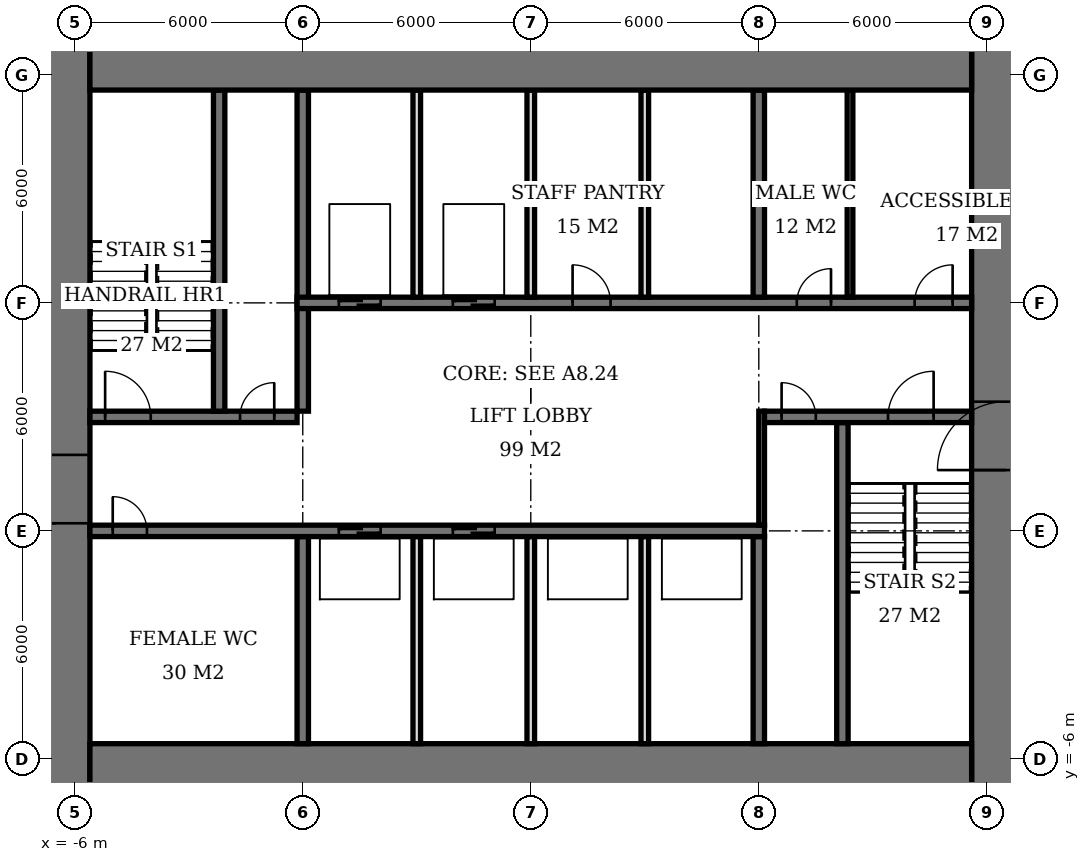
"""IFC4 building model, lengths in metres.
Left out: names, types, materials, properties, quantities, classifications, styles, units other than length and angle.
Written with IfcOpenShell. Run it as: python <this file> out.ifc"""

import sys

from ifc_helpers import new_model, si_unit, direction, frame, frame_2d, origin, place, context, subcontext, project, spatial, rectangle, extrude, element, fill, save


model = new_model("IFC4")
c1 = context("Model", 3, precision=1e-05, world=origin(), true_north=direction((0.0, 1.0)))
c2 = subcontext(c1, "Body", "Model", "MODEL_VIEW")
j1 = project(units=[si_unit("LENGTHUNIT", "METRE"), si_unit("PLANEANGLEUNIT", "RADIAN")], contexts=[c1])
p1 = place(None, origin())
s1 = spatial("IfcSite", under=j1, at=p1, CompositionType="ELEMENT")
p2 = place(p1, origin())
s2 = spatial("IfcBuilding", under=s1, at=p2, CompositionType="ELEMENT")
p3 = place(p2, frame((0.0, 0.0, 144.5)))
s3 = spatial("IfcBuildingStorey", under=s2, at=p3, CompositionType="ELEMENT", Elevation=144.5)
for number, where, z_axis, x_axis in (
    (1, (-5.6, -6.6, 0.0), (0.0, 0.0, 1.0), (1.0, 0.0, 0.0)),
    (2, (-5.6, 12.6, 0.0), (0.0, 0.0, 1.0), (1.0, 0.0, 0.0)),
):
    element("IfcWall", number, at=place(p3, frame(where, z_axis=z_axis, x_axis=x_axis)), inside=s3, PredefinedType="SHEAR", context=c2, shape_type="SweptSolid", body=[
        extrude(rectangle(XDim=23.2, YDim=2.0, at=frame_2d((11.6, 0.0))), origin(), (0.0, 0.0, 1.0), 3.9),
    ])
p4 = place(p3, frame((-6.5, -7.6, 0.0), z_axis=(0.0, 0.0, 1.0), x_axis=(0.0, 1.0, 0.0)))
e3 = element("IfcWall", 3, at=p4, inside=s3, PredefinedType="SHEAR", context=c2, shape_type="SweptSolid", body=[
    extrude(rectangle(XDim=21.2, YDim=1.8, at=frame_2d((10.6, 0.0))), origin(), (0.0, 0.0, 1.0), 3.9),
])
p5 = place(p4, frame((7.8, 0.0, 0.0)))
e4 = element("IfcOpeningElement", 4, at=p5, cuts=e3, PredefinedType="OPENING", context=c2, shape_type="SweptSolid", body=[
    extrude(rectangle(XDim=1.8, YDim=2.4, at=frame_2d((0.9, 1.2))), frame((0.0, 0.91, 0.0), z_axis=(0.0, -1.0, 0.0), x_axis=(1.0, 0.0, 0.0)), (0.0, 0.0, 1.0), 1.82),
])
p6 = place(p3, frame((18.5, -7.6, 0.0), z_axis=(0.0, 0.0, 1.0), x_axis=(0.0, 1.0, 0.0)))
e5 = element("IfcWall", 5, at=p6, inside=s3, PredefinedType="SHEAR", context=c2, shape_type="SweptSolid", body=[
    extrude(rectangle(XDim=21.2, YDim=1.8, at=frame_2d((10.6, 0.0))), origin(), (0.0, 0.0, 1.0), 3.9),
])
p7 = place(p6, frame((9.2, 0.0, 0.0)))
e6 = element("IfcOpeningElement", 6, at=p7, cuts=e5, PredefinedType="OPENING", context=c2, shape_type="SweptSolid", body=[
    extrude(rectangle(XDim=1.8, YDim=2.4, at=frame_2d((0.9, 1.2))), frame((0.0, 0.91, 0.0), z_axis=(0.0, -1.0, 0.0), x_axis=(1.0, 0.0, 0.0)), (0.0, 0.0, 1.0), 1.82),
])
p8 = place(p3, frame((-5.6, 0.0, 0.0), z_axis=(0.0, 0.0, 1.0), x_axis=(1.0, 0.0, 0.0)))
e7 = element("IfcWall", 7, at=p8, inside=s3, PredefinedType="SHEAR", context=c2, shape_type="SweptSolid", body=[
    extrude(rectangle(XDim=17.75, YDim=0.3, at=frame_2d((8.875, 0.0))), origin(), (0.0, 0.0, 1.0), 3.9),
])
p9 = place(p8, frame((0.6, 0.0, 0.0)))
e8 = element("IfcOpeningElement", 8, at=p9, cuts=e7, PredefinedType="OPENING", context=c2, shape_type="SweptSolid", body=[
    extrude(rectangle(XDim=0.9, YDim=2.1, at=frame_2d((0.45, 1.05))), frame((0.0, 0.16, 0.0), z_axis=(0.0, -1.0, 0.0), x_axis=(1.0, 0.0, 0.0)), (0.0, 0.0, 1.0), 0.32),
])
p10 = place(p8, frame((6.55, 0.0, 0.0)))
e9 = element("IfcOpeningElement", 9, at=p10, cuts=e7, PredefinedType="OPENING", context=c2, shape_type="SweptSolid", body=[
    extrude(rectangle(XDim=1.1, YDim=2.1, at=frame_2d((0.55, 1.05))), frame((0.0, 0.16, 0.0), z_axis=(0.0, -1.0, 0.0), x_axis=(1.0, 0.0, 0.0)), (0.0, 0.0, 1.0), 0.32),
])
p11 = place(p8, frame((9.55, 0.0, 0.0)))
e10 = element("IfcOpeningElement", 10, at=p11, cuts=e7, PredefinedType="OPENING", context=c2, shape_type="SweptSolid", body=[
    extrude(rectangle(XDim=1.1, YDim=2.1, at=frame_2d((0.55, 1.05))), frame((0.0, 0.16, 0.0), z_axis=(0.0, -1.0, 0.0), x_axis=(1.0, 0.0, 0.0)), (0.0, 0.0, 1.0), 0.32),
])
p12 = place(p3, frame((-5.6, 3.0, 0.0), z_axis=(0.0, 0.0, 1.0), x_axis=(1.0, 0.0, 0.0)))
e11 = element("IfcWall", 11, at=p12, inside=s3, PredefinedType="SHEAR", context=c2, shape_type="SweptSolid", body=[
    extrude(rectangle(XDim=5.45, YDim=0.3, at=frame_2d((2.725, 0.0))), origin(), (0.0, 0.0, 1.0), 3.9),
])
p13 = place(p12, frame((0.4, 0.0, 0.0)))
e12 = element("IfcOpeningElement", 12, at=p13, cuts=e11, PredefinedType="OPENING", context=c2, shape_type="SweptSolid", body=[
    extrude(rectangle(XDim=1.2, YDim=2.1, at=frame_2d((0.6, 1.05))), frame((0.0, 0.16, 0.0), z_axis=(0.0, -1.0, 0.0), x_axis=(1.0, 0.0, 0.0)), (0.0, 0.0, 1.0), 0.32),
])
p14 = place(p12, frame((3.95, 0.0, 0.0)))
e13 = element("IfcOpeningElement", 13, at=p14, cuts=e11, PredefinedType="OPENING", context=c2, shape_type="SweptSolid", body=[
    extrude(rectangle(XDim=0.9, YDim=2.1, at=frame_2d((0.45, 1.05))), frame((0.0, 0.16, 0.0), z_axis=(0.0, -1.0, 0.0), x_axis=(1.0, 0.0, 0.0)), (0.0, 0.0, 1.0), 0.32),
])
p15 = place(p3, frame((12.15, 3.0, 0.0), z_axis=(0.0, 0.0, 1.0), x_axis=(1.0, 0.0, 0.0)))
e14 = element("IfcWall", 14, at=p15, inside=s3, PredefinedType="SHEAR", context=c2, shape_type="SweptSolid", body=[
    extrude(rectangle(XDim=5.45, YDim=0.3, at=frame_2d((2.725, 0.0))), origin(), (0.0, 0.0, 1.0), 3.9),
])
p16 = place(p15, frame((3.25, 0.0, 0.0)))
e15 = element("IfcOpeningElement", 15, at=p16, cuts=e14, PredefinedType="OPENING", context=c2, shape_type="SweptSolid", body=[
    extrude(rectangle(XDim=1.2, YDim=2.1, at=frame_2d((0.6, 1.05))), frame((0.0, 0.16, 0.0), z_axis=(0.0, -1.0, 0.0), x_axis=(1.0, 0.0, 0.0)), (0.0, 0.0, 1.0), 0.32),
])
p17 = place(p15, frame((0.45, 0.0, 0.0)))
e16 = element("IfcOpeningElement", 16, at=p17, cuts=e14, PredefinedType="OPENING", context=c2, shape_type="SweptSolid", body=[
    extrude(rectangle(XDim=0.9, YDim=2.1, at=frame_2d((0.45, 1.05))), frame((0.0, 0.16, 0.0), z_axis=(0.0, -1.0, 0.0), x_axis=(1.0, 0.0, 0.0)), (0.0, 0.0, 1.0), 0.32),
])
p18 = place(p3, frame((-0.15, 6.0, 0.0), z_axis=(0.0, 0.0, 1.0), x_axis=(1.0, 0.0, 0.0)))
e17 = element("IfcWall", 17, at=p18, inside=s3, PredefinedType="SHEAR", context=c2, shape_type="SweptSolid", body=[
    extrude(rectangle(XDim=17.75, YDim=0.3, at=frame_2d((8.875, 0.0))), origin(), (0.0, 0.0, 1.0), 3.9),
])
p19 = place(p18, frame((13.15, 0.0, 0.0)))
e18 = element("IfcOpeningElement", 18, at=p19, cuts=e17, PredefinedType="OPENING", context=c2, shape_type="SweptSolid", body=[
    extrude(rectangle(XDim=0.9, YDim=2.1, at=frame_2d((0.45, 1.05))), frame((0.0, 0.16, 0.0), z_axis=(0.0, -1.0, 0.0), x_axis=(1.0, 0.0, 0.0)), (0.0, 0.0, 1.0), 0.32),
])
p20 = place(p18, frame((16.25, 0.0, 0.0)))
e19 = element("IfcOpeningElement", 19, at=p20, cuts=e17, PredefinedType="OPENING", context=c2, shape_type="SweptSolid", body=[
    extrude(rectangle(XDim=1.0, YDim=2.1, at=frame_2d((0.5, 1.05))), frame((0.0, 0.16, 0.0), z_axis=(0.0, -1.0, 0.0), x_axis=(1.0, 0.0, 0.0)), (0.0, 0.0, 1.0), 0.32),
])
p21 = place(p18, frame((7.25, 0.0, 0.0)))
e20 = element("IfcOpeningElement", 20, at=p21, cuts=e17, PredefinedType="OPENING", context=c2, shape_type="SweptSolid", body=[
    extrude(rectangle(XDim=1.0, YDim=2.1, at=frame_2d((0.5, 1.05))), frame((0.0, 0.16, 0.0), z_axis=(0.0, -1.0, 0.0), x_axis=(1.0, 0.0, 0.0)), (0.0, 0.0, 1.0), 0.32),
])
p22 = place(p18, frame((1.1, 0.0, 0.0)))
e21 = element("IfcOpeningElement", 21, at=p22, cuts=e17, PredefinedType="OPENING", context=c2, shape_type="SweptSolid", body=[
    extrude(rectangle(XDim=1.1, YDim=2.1, at=frame_2d((0.55, 1.05))), frame((0.0, 0.16, 0.0), z_axis=(0.0, -1.0, 0.0), x_axis=(1.0, 0.0, 0.0)), (0.0, 0.0, 1.0), 0.32),
])
p23 = place(p18, frame((4.1, 0.0, 0.0)))
e22 = element("IfcOpeningElement", 22, at=p23, cuts=e17, PredefinedType="OPENING", context=c2, shape_type="SweptSolid", body=[
    extrude(rectangle(XDim=1.1, YDim=2.1, at=frame_2d((0.55, 1.05))), frame((0.0, 0.16, 0.0), z_axis=(0.0, -1.0, 0.0), x_axis=(1.0, 0.0, 0.0)), (0.0, 0.0, 1.0), 0.32),
])
p24 = place(p3, frame((0.0, -5.6, 0.0), z_axis=(0.0, 0.0, 1.0), x_axis=(0.0, 1.0, 0.0)))
e23 = element("IfcWall", 23, at=p24, inside=s3, PredefinedType="SHEAR", context=c2, shape_type="SweptSolid", body=[
    extrude(rectangle(XDim=5.45, YDim=0.3, at=frame_2d((2.725, 0.0))), origin(), (0.0, 0.0, 1.0), 3.9),
])
p25 = place(p3, frame((0.0, 3.15, 0.0), z_axis=(0.0, 0.0, 1.0), x_axis=(0.0, 1.0, 0.0)))
e24 = element("IfcWall", 24, at=p25, inside=s3, PredefinedType="SHEAR", context=c2, shape_type="SweptSolid", body=[
    extrude(rectangle(XDim=8.45, YDim=0.3, at=frame_2d((4.225, 0.0))), origin(), (0.0, 0.0, 1.0), 3.9),
])
for number, where, z_axis, x_axis in (
    (25, (12.0, -5.6, 0.0), (0.0, 0.0, 1.0), (0.0, 1.0, 0.0)),
    (26, (12.0, 6.15, 0.0), (0.0, 0.0, 1.0), (0.0, 1.0, 0.0)),
):
    element("IfcWall", number, at=place(p3, frame(where, z_axis=z_axis, x_axis=x_axis)), inside=s3, PredefinedType="SHEAR", context=c2, shape_type="SweptSolid", body=[
        extrude(rectangle(XDim=5.45, YDim=0.3, at=frame_2d((2.725, 0.0))), origin(), (0.0, 0.0, 1.0), 3.9),
    ])
for number, where, z_axis, x_axis in (
    (27, (-2.2, 3.15, 0.0), (0.0, 0.0, 1.0), (0.0, 1.0, 0.0)),
    (28, (14.2, -5.6, 0.0), (0.0, 0.0, 1.0), (0.0, 1.0, 0.0)),
):
    element("IfcWall", number, at=place(p3, frame(where, z_axis=z_axis, x_axis=x_axis)), inside=s3, PredefinedType="SHEAR", context=c2, shape_type="SweptSolid", body=[
        extrude(rectangle(XDim=8.45, YDim=0.3, at=frame_2d((4.225, 0.0))), origin(), (0.0, 0.0, 1.0), 3.9),
    ])
for number, where, z_axis, x_axis in (
    (29, (3.0, 6.15, 0.0), (0.0, 0.0, 1.0), (0.0, 1.0, 0.0)),
    (30, (6.0, 6.15, 0.0), (0.0, 0.0, 1.0), (0.0, 1.0, 0.0)),
    (31, (9.0, 6.15, 0.0), (0.0, 0.0, 1.0), (0.0, 1.0, 0.0)),
    (32, (3.0, -5.6, 0.0), (0.0, 0.0, 1.0), (0.0, 1.0, 0.0)),
    (33, (6.0, -5.6, 0.0), (0.0, 0.0, 1.0), (0.0, 1.0, 0.0)),
    (34, (9.0, -5.6, 0.0), (0.0, 0.0, 1.0), (0.0, 1.0, 0.0)),
):
    element("IfcWall", number, at=place(p3, frame(where, z_axis=z_axis, x_axis=x_axis)), inside=s3, PredefinedType="SOLIDWALL", context=c2, shape_type="SweptSolid", body=[
        extrude(rectangle(XDim=5.45, YDim=0.2, at=frame_2d((2.725, 0.0))), origin(), (0.0, 0.0, 1.0), 3.9),
    ])
p26 = place(p3, frame((14.4, 6.15, 0.0), z_axis=(0.0, 0.0, 1.0), x_axis=(0.0, 1.0, 0.0)))
e35 = element("IfcWall", 35, at=p26, inside=s3, PredefinedType="PLUMBINGWALL", context=c2, shape_type="SweptSolid", body=[
    extrude(rectangle(XDim=5.45, YDim=0.15, at=frame_2d((2.725, 0.0))), origin(), (0.0, 0.0, 1.0), 3.65),
])
p27 = place(p3, frame((12.075, 0.15, 0.0), z_axis=(0.0, 0.0, 1.0), x_axis=(0.0, 1.0, 0.0)))
e36 = element("IfcWall", 36, at=p27, inside=s3, PredefinedType="PARTITIONING", context=c2, shape_type="SweptSolid", body=[
    extrude(rectangle(XDim=3.0, YDim=0.15, at=frame_2d((1.5, 0.0))), origin(), (0.0, 0.0, 1.0), 3.65),
])
p28 = place(p5, origin())
e37 = element("IfcDoor", 37, at=p28, inside=s3, OperationType="DOUBLE_DOOR_SINGLE_SWING", PredefinedType="DOOR", context=c2, shape_type="SweptSolid", body=[
    extrude(rectangle(XDim=1.8, YDim=2.4, at=frame_2d((0.9, 1.2))), frame((0.0, 0.025, 0.0), z_axis=(0.0, -1.0, 0.0), x_axis=(1.0, 0.0, 0.0)), (0.0, 0.0, 1.0), 0.05),
])
fill(e4, e37)
p29 = place(p7, origin())
e38 = element("IfcDoor", 38, at=p29, inside=s3, OperationType="DOUBLE_DOOR_SINGLE_SWING", PredefinedType="DOOR", context=c2, shape_type="SweptSolid", body=[
    extrude(rectangle(XDim=1.8, YDim=2.4, at=frame_2d((0.9, 1.2))), frame((0.0, 0.025, 0.0), z_axis=(0.0, -1.0, 0.0), x_axis=(1.0, 0.0, 0.0)), (0.0, 0.0, 1.0), 0.05),
])
fill(e6, e38)
p30 = place(p13, origin())
e39 = element("IfcDoor", 39, at=p30, inside=s3, OperationType="SINGLE_SWING_LEFT", PredefinedType="DOOR", context=c2, shape_type="SweptSolid", body=[
    extrude(rectangle(XDim=1.2, YDim=2.1, at=frame_2d((0.6, 1.05))), frame((0.0, 0.025, 0.0), z_axis=(0.0, -1.0, 0.0), x_axis=(1.0, 0.0, 0.0)), (0.0, 0.0, 1.0), 0.05),
])
fill(e12, e39)
p31 = place(p14, origin())
e40 = element("IfcDoor", 40, at=p31, inside=s3, OperationType="SINGLE_SWING_RIGHT", PredefinedType="DOOR", context=c2, shape_type="SweptSolid", body=[
    extrude(rectangle(XDim=0.9, YDim=2.1, at=frame_2d((0.45, 1.05))), frame((0.0, 0.025, 0.0), z_axis=(0.0, -1.0, 0.0), x_axis=(1.0, 0.0, 0.0)), (0.0, 0.0, 1.0), 0.05),
])
fill(e13, e40)
p32 = place(p16, origin())
e41 = element("IfcDoor", 41, at=p32, inside=s3, OperationType="SINGLE_SWING_RIGHT", PredefinedType="DOOR", context=c2, shape_type="SweptSolid", body=[
    extrude(rectangle(XDim=1.2, YDim=2.1, at=frame_2d((0.6, 1.05))), frame((0.0, 0.025, 0.0), z_axis=(0.0, -1.0, 0.0), x_axis=(1.0, 0.0, 0.0)), (0.0, 0.0, 1.0), 0.05),
])
fill(e15, e41)
p33 = place(p17, origin())
e42 = element("IfcDoor", 42, at=p33, inside=s3, OperationType="SINGLE_SWING_LEFT", PredefinedType="DOOR", context=c2, shape_type="SweptSolid", body=[
    extrude(rectangle(XDim=0.9, YDim=2.1, at=frame_2d((0.45, 1.05))), frame((0.0, 0.025, 0.0), z_axis=(0.0, -1.0, 0.0), x_axis=(1.0, 0.0, 0.0)), (0.0, 0.0, 1.0), 0.05),
])
fill(e16, e42)
p34 = place(p9, origin())
e43 = element("IfcDoor", 43, at=p34, inside=s3, OperationType="SINGLE_SWING_LEFT", PredefinedType="DOOR", context=c2, shape_type="SweptSolid", body=[
    extrude(rectangle(XDim=0.9, YDim=2.1, at=frame_2d((0.45, 1.05))), frame((0.0, 0.025, 0.0), z_axis=(0.0, -1.0, 0.0), x_axis=(1.0, 0.0, 0.0)), (0.0, 0.0, 1.0), 0.05),
])
fill(e8, e43)
p35 = place(p19, origin())
e44 = element("IfcDoor", 44, at=p35, inside=s3, OperationType="SINGLE_SWING_RIGHT", PredefinedType="DOOR", context=c2, shape_type="SweptSolid", body=[
    extrude(rectangle(XDim=0.9, YDim=2.1, at=frame_2d((0.45, 1.05))), frame((0.0, 0.025, 0.0), z_axis=(0.0, -1.0, 0.0), x_axis=(1.0, 0.0, 0.0)), (0.0, 0.0, 1.0), 0.05),
])
fill(e18, e44)
p36 = place(p20, origin())
e45 = element("IfcDoor", 45, at=p36, inside=s3, OperationType="SINGLE_SWING_RIGHT", PredefinedType="DOOR", context=c2, shape_type="SweptSolid", body=[
    extrude(rectangle(XDim=1.0, YDim=2.1, at=frame_2d((0.5, 1.05))), frame((0.0, 0.025, 0.0), z_axis=(0.0, -1.0, 0.0), x_axis=(1.0, 0.0, 0.0)), (0.0, 0.0, 1.0), 0.05),
])
fill(e19, e45)
p37 = place(p21, origin())
e46 = element("IfcDoor", 46, at=p37, inside=s3, OperationType="SINGLE_SWING_LEFT", PredefinedType="DOOR", context=c2, shape_type="SweptSolid", body=[
    extrude(rectangle(XDim=1.0, YDim=2.1, at=frame_2d((0.5, 1.05))), frame((0.0, 0.025, 0.0), z_axis=(0.0, -1.0, 0.0), x_axis=(1.0, 0.0, 0.0)), (0.0, 0.0, 1.0), 0.05),
])
fill(e20, e46)
p38 = place(p22, origin())
e47 = element("IfcDoor", 47, at=p38, inside=s3, OperationType="DOUBLE_DOOR_SLIDING", PredefinedType="USERDEFINED", context=c2, shape_type="SweptSolid", body=[
    extrude(rectangle(XDim=1.1, YDim=2.1, at=frame_2d((0.55, 1.05))), frame((0.0, 0.025, 0.0), z_axis=(0.0, -1.0, 0.0), x_axis=(1.0, 0.0, 0.0)), (0.0, 0.0, 1.0), 0.05),
])
fill(e21, e47)
p39 = place(p23, origin())
e48 = element("IfcDoor", 48, at=p39, inside=s3, OperationType="DOUBLE_DOOR_SLIDING", PredefinedType="USERDEFINED", context=c2, shape_type="SweptSolid", body=[
    extrude(rectangle(XDim=1.1, YDim=2.1, at=frame_2d((0.55, 1.05))), frame((0.0, 0.025, 0.0), z_axis=(0.0, -1.0, 0.0), x_axis=(1.0, 0.0, 0.0)), (0.0, 0.0, 1.0), 0.05),
])
fill(e22, e48)
p40 = place(p10, origin())
e49 = element("IfcDoor", 49, at=p40, inside=s3, OperationType="DOUBLE_DOOR_SLIDING", PredefinedType="USERDEFINED", context=c2, shape_type="SweptSolid", body=[
    extrude(rectangle(XDim=1.1, YDim=2.1, at=frame_2d((0.55, 1.05))), frame((0.0, 0.025, 0.0), z_axis=(0.0, -1.0, 0.0), x_axis=(1.0, 0.0, 0.0)), (0.0, 0.0, 1.0), 0.05),
])
fill(e9, e49)
p41 = place(p11, origin())
e50 = element("IfcDoor", 50, at=p41, inside=s3, OperationType="DOUBLE_DOOR_SLIDING", PredefinedType="USERDEFINED", context=c2, shape_type="SweptSolid", body=[
    extrude(rectangle(XDim=1.1, YDim=2.1, at=frame_2d((0.55, 1.05))), frame((0.0, 0.025, 0.0), z_axis=(0.0, -1.0, 0.0), x_axis=(1.0, 0.0, 0.0)), (0.0, 0.0, 1.0), 0.05),
])
fill(e10, e50)
save(model, sys.argv[1])
